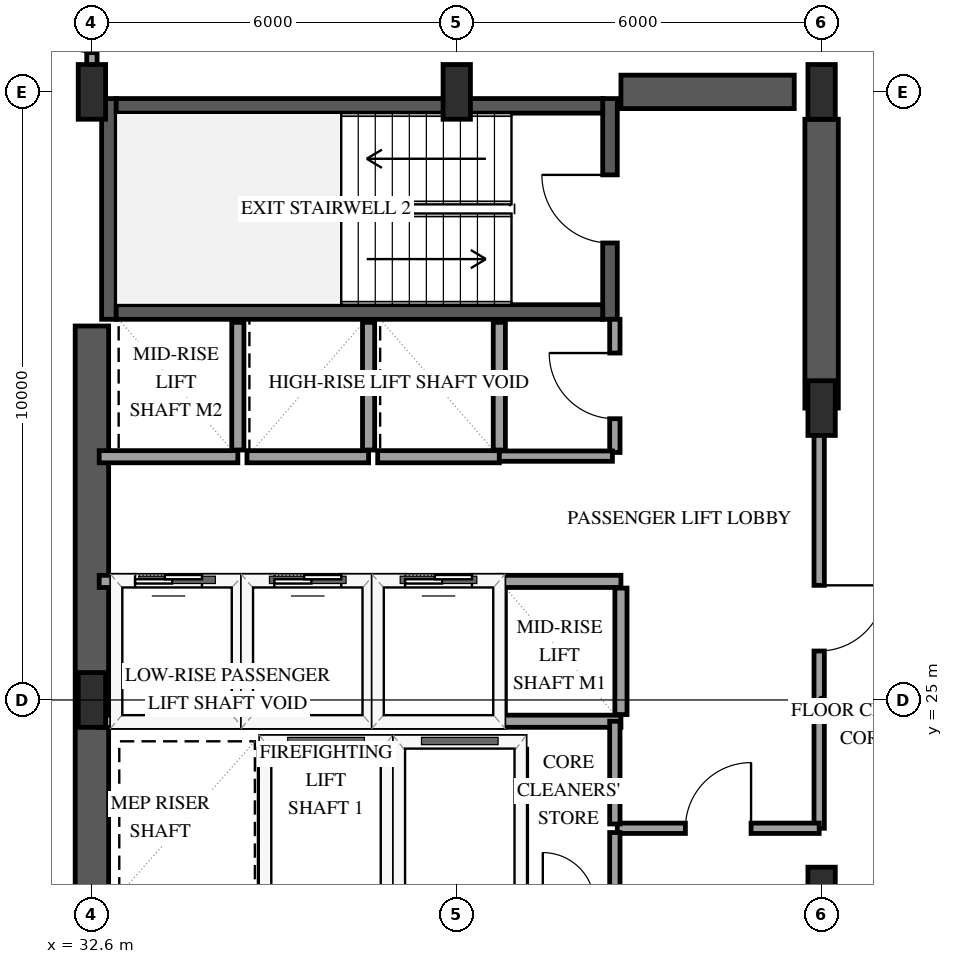
"""IFC4 building model, lengths in metres.
Left out: names, types, materials, properties, quantities, classifications, styles, units other than length and angle.
Written with IfcOpenShell. Run it as: python <this file> out.ifc"""

import sys

from ifc_helpers import new_model, si_unit, direction, frame, frame_2d, origin, origin_2d, place, context, subcontext, project, spatial, rectangle, extrude, element, fill, save


model = new_model("IFC4")
c1 = context("Model", 3, precision=1e-05, world=origin(), true_north=direction((0.0, 1.0)))
c2 = subcontext(c1, "Body", "Model", "MODEL_VIEW")
j1 = project(units=[si_unit("LENGTHUNIT", "METRE"), si_unit("PLANEANGLEUNIT", "RADIAN")], contexts=[c1])
p1 = place(None, origin())
s1 = spatial("IfcSite", under=j1, at=p1, CompositionType="ELEMENT")
p2 = place(p1, origin())
s2 = spatial("IfcBuilding", under=s1, at=p2, CompositionType="ELEMENT")
p3 = place(p2, frame((0.0, 0.0, 106.9)))
s3 = spatial("IfcBuildingStorey", under=s2, at=p3, CompositionType="ELEMENT", Elevation=106.9)
p4 = place(p3, frame((32.88, 31.26, 0.0), z_axis=(0.0, 0.0, 1.0), x_axis=(0.0, 1.0, 0.0)))
e1 = element("IfcWall", 1, at=p4, inside=s3, PredefinedType="SHEAR", context=c2, shape_type="SweptSolid", body=[
    extrude(rectangle(XDim=3.63, YDim=0.24, at=frame_2d((1.815, 0.0))), origin(), (0.0, 0.0, 1.0), 3.9),
])
p5 = place(p3, frame((41.12, 31.26, 0.0), z_axis=(0.0, 0.0, 1.0), x_axis=(0.0, 1.0, 0.0)))
e2 = element("IfcWall", 2, at=p5, inside=s3, PredefinedType="SHEAR", context=c2, shape_type="SweptSolid", body=[
    extrude(rectangle(XDim=3.63, YDim=0.24, at=frame_2d((1.815, 0.0))), origin(), (0.0, 0.0, 1.0), 3.9),
])
p6 = place(p5, frame((1.255, 0.0, 0.0)))
e3 = element("IfcOpeningElement", 3, at=p6, cuts=e2, PredefinedType="OPENING", context=c2, shape_type="SweptSolid", body=[
    extrude(rectangle(XDim=1.12, YDim=2.15, at=frame_2d((0.56, 1.075))), frame((0.0, 0.13, 0.0), z_axis=(0.0, -1.0, 0.0), x_axis=(1.0, 0.0, 0.0)), (0.0, 0.0, 1.0), 0.26),
])
for number, where, z_axis, x_axis in (
    (4, (33.0, 31.38, 0.0), (0.0, 0.0, 1.0), (1.0, 0.0, 0.0)),
    (5, (33.0, 34.77, 0.0), (0.0, 0.0, 1.0), (1.0, 0.0, 0.0)),
):
    element("IfcWall", number, at=place(p3, frame(where, z_axis=z_axis, x_axis=x_axis)), inside=s3, PredefinedType="SHEAR", context=c2, shape_type="SweptSolid", body=[
        extrude(rectangle(XDim=8.0, YDim=0.24, at=frame_2d((4.0, 0.0))), origin(), (0.0, 0.0, 1.0), 3.9),
    ])
p7 = place(p3, frame((32.6, 18.85, 0.0), z_axis=(0.0, 0.0, 1.0), x_axis=(0.0, 1.0, 0.0)))
e6 = element("IfcWall", 6, at=p7, inside=s3, PredefinedType="SHEAR", context=c2, shape_type="SweptSolid", body=[
    extrude(rectangle(XDim=12.3, YDim=0.55, at=frame_2d((6.15, 0.0))), origin(), (0.0, 0.0, 1.0), 3.9),
])
p8 = place(p3, frame((41.3, 35.0, 0.0), z_axis=(0.0, 0.0, 1.0), x_axis=(1.0, 0.0, 0.0)))
e7 = element("IfcWall", 7, at=p8, inside=s3, PredefinedType="SHEAR", context=c2, shape_type="SweptSolid", body=[
    extrude(rectangle(XDim=2.85, YDim=0.55, at=frame_2d((1.425, 0.0))), origin(), (0.0, 0.0, 1.0), 3.9),
])
p9 = place(p3, frame((44.6, 29.8, 0.0), z_axis=(0.0, 0.0, 1.0), x_axis=(0.0, 1.0, 0.0)))
e8 = element("IfcWall", 8, at=p9, inside=s3, PredefinedType="SHEAR", context=c2, shape_type="SweptSolid", body=[
    extrude(rectangle(XDim=4.75, YDim=0.55, at=frame_2d((2.375, 0.0))), origin(), (0.0, 0.0, 1.0), 3.9),
])
for number, where, z_axis, x_axis in (
    (9, (32.6, 25.0, 0.0), (0.0, 0.0, 1.0), (1.0, 0.0, 0.0)),
    (10, (32.6, 35.0, 0.0), (0.0, 0.0, 1.0), (1.0, 0.0, 0.0)),
    (11, (38.6, 35.0, 0.0), (0.0, 0.0, 1.0), (1.0, 0.0, 0.0)),
    (12, (44.6, 21.8, 0.0), (0.0, 0.0, 1.0), (1.0, 0.0, 0.0)),
    (13, (44.6, 29.8, 0.0), (0.0, 0.0, 1.0), (1.0, 0.0, 0.0)),
    (14, (44.6, 35.0, 0.0), (0.0, 0.0, 1.0), (1.0, 0.0, 0.0)),
):
    element("IfcColumn", number, at=place(p3, frame(where, z_axis=z_axis, x_axis=x_axis)), inside=s3, PredefinedType="PILASTER", context=c2, shape_type="SweptSolid", body=[
        extrude(rectangle(XDim=0.45, YDim=0.9, at=origin_2d()), origin(), (0.0, 0.0, 1.0), 3.9),
    ])
p10 = place(p3, frame((35.45, 24.3, 0.0), z_axis=(0.0, 0.0, 1.0), x_axis=(1.0, 0.0, 0.0)))
e15 = element("IfcWall", 15, at=p10, inside=s3, PredefinedType="SOLIDWALL", context=c2, shape_type="SweptSolid", body=[
    extrude(rectangle(XDim=2.0, YDim=0.2, at=frame_2d((1.0, 0.0))), origin(), (0.0, 0.0, 1.0), 3.6),
])
for number, where, z_axis, x_axis in (
    (16, (35.45, 21.81, 0.0), (0.0, 0.0, 1.0), (0.0, 1.0, 0.0)),
    (17, (37.45, 21.81, 0.0), (0.0, 0.0, 1.0), (0.0, 1.0, 0.0)),
):
    element("IfcWall", number, at=place(p3, frame(where, z_axis=z_axis, x_axis=x_axis)), inside=s3, PredefinedType="SOLIDWALL", context=c2, shape_type="SweptSolid", body=[
        extrude(rectangle(XDim=2.38, YDim=0.2, at=frame_2d((1.19, 0.0))), origin(), (0.0, 0.0, 1.0), 3.6),
    ])
p11 = place(p3, frame((37.65, 24.3, 0.0), z_axis=(0.0, 0.0, 1.0), x_axis=(1.0, 0.0, 0.0)))
e18 = element("IfcWall", 18, at=p11, inside=s3, PredefinedType="SOLIDWALL", context=c2, shape_type="SweptSolid", body=[
    extrude(rectangle(XDim=2.0, YDim=0.2, at=frame_2d((1.0, 0.0))), origin(), (0.0, 0.0, 1.0), 3.6),
])
p12 = place(p3, frame((39.65, 21.81, 0.0), z_axis=(0.0, 0.0, 1.0), x_axis=(0.0, 1.0, 0.0)))
e19 = element("IfcWall", 19, at=p12, inside=s3, PredefinedType="SOLIDWALL", context=c2, shape_type="SweptSolid", body=[
    extrude(rectangle(XDim=2.38, YDim=0.2, at=frame_2d((1.19, 0.0))), origin(), (0.0, 0.0, 1.0), 3.6),
])
p13 = place(p3, frame((32.72, 24.65, 0.0), z_axis=(0.0, 0.0, 1.0), x_axis=(1.0, 0.0, 0.0)))
e20 = element("IfcWall", 20, at=p13, inside=s3, PredefinedType="SOLIDWALL", context=c2, shape_type="SweptSolid", body=[
    extrude(rectangle(XDim=2.28, YDim=0.2, at=frame_2d((1.14, 0.0))), origin(), (0.0, 0.0, 1.0), 3.6),
])
p14 = place(p3, frame((32.72, 26.95, 0.0), z_axis=(0.0, 0.0, 1.0), x_axis=(1.0, 0.0, 0.0)))
e21 = element("IfcWall", 21, at=p14, inside=s3, PredefinedType="SOLIDWALL", context=c2, shape_type="SweptSolid", body=[
    extrude(rectangle(XDim=2.28, YDim=0.2, at=frame_2d((1.14, 0.0))), origin(), (0.0, 0.0, 1.0), 3.6),
])
p15 = place(p14, frame((0.59, 0.0, 0.0)))
e22 = element("IfcOpeningElement", 22, at=p15, cuts=e21, PredefinedType="OPENING", context=c2, shape_type="SweptSolid", body=[
    extrude(rectangle(XDim=1.1, YDim=2.15, at=frame_2d((0.55, 1.075))), frame((0.0, 0.11, 0.0), z_axis=(0.0, -1.0, 0.0), x_axis=(1.0, 0.0, 0.0)), (0.0, 0.0, 1.0), 0.22),
])
p16 = place(p3, frame((35.0, 24.76, 0.0), z_axis=(0.0, 0.0, 1.0), x_axis=(0.0, 1.0, 0.0)))
e23 = element("IfcWall", 23, at=p16, inside=s3, PredefinedType="SOLIDWALL", context=c2, shape_type="SweptSolid", body=[
    extrude(rectangle(XDim=2.08, YDim=0.2, at=frame_2d((1.04, 0.0))), origin(), (0.0, 0.0, 1.0), 3.6),
])
p17 = place(p3, frame((35.15, 24.65, 0.0), z_axis=(0.0, 0.0, 1.0), x_axis=(1.0, 0.0, 0.0)))
e24 = element("IfcWall", 24, at=p17, inside=s3, PredefinedType="SOLIDWALL", context=c2, shape_type="SweptSolid", body=[
    extrude(rectangle(XDim=2.0, YDim=0.2, at=frame_2d((1.0, 0.0))), origin(), (0.0, 0.0, 1.0), 3.6),
])
p18 = place(p3, frame((35.15, 26.95, 0.0), z_axis=(0.0, 0.0, 1.0), x_axis=(1.0, 0.0, 0.0)))
e25 = element("IfcWall", 25, at=p18, inside=s3, PredefinedType="SOLIDWALL", context=c2, shape_type="SweptSolid", body=[
    extrude(rectangle(XDim=2.0, YDim=0.2, at=frame_2d((1.0, 0.0))), origin(), (0.0, 0.0, 1.0), 3.6),
])
p19 = place(p18, frame((0.45, 0.0, 0.0)))
e26 = element("IfcOpeningElement", 26, at=p19, cuts=e25, PredefinedType="OPENING", context=c2, shape_type="SweptSolid", body=[
    extrude(rectangle(XDim=1.1, YDim=2.15, at=frame_2d((0.55, 1.075))), frame((0.0, 0.11, 0.0), z_axis=(0.0, -1.0, 0.0), x_axis=(1.0, 0.0, 0.0)), (0.0, 0.0, 1.0), 0.22),
])
p20 = place(p3, frame((37.15, 24.76, 0.0), z_axis=(0.0, 0.0, 1.0), x_axis=(0.0, 1.0, 0.0)))
e27 = element("IfcWall", 27, at=p20, inside=s3, PredefinedType="SOLIDWALL", context=c2, shape_type="SweptSolid", body=[
    extrude(rectangle(XDim=2.08, YDim=0.2, at=frame_2d((1.04, 0.0))), origin(), (0.0, 0.0, 1.0), 3.6),
])
p21 = place(p3, frame((37.3, 24.65, 0.0), z_axis=(0.0, 0.0, 1.0), x_axis=(1.0, 0.0, 0.0)))
e28 = element("IfcWall", 28, at=p21, inside=s3, PredefinedType="SOLIDWALL", context=c2, shape_type="SweptSolid", body=[
    extrude(rectangle(XDim=2.0, YDim=0.2, at=frame_2d((1.0, 0.0))), origin(), (0.0, 0.0, 1.0), 3.6),
])
p22 = place(p3, frame((37.3, 26.95, 0.0), z_axis=(0.0, 0.0, 1.0), x_axis=(1.0, 0.0, 0.0)))
e29 = element("IfcWall", 29, at=p22, inside=s3, PredefinedType="SOLIDWALL", context=c2, shape_type="SweptSolid", body=[
    extrude(rectangle(XDim=2.0, YDim=0.2, at=frame_2d((1.0, 0.0))), origin(), (0.0, 0.0, 1.0), 3.6),
])
p23 = place(p22, frame((0.45, 0.0, 0.0)))
e30 = element("IfcOpeningElement", 30, at=p23, cuts=e29, PredefinedType="OPENING", context=c2, shape_type="SweptSolid", body=[
    extrude(rectangle(XDim=1.1, YDim=2.15, at=frame_2d((0.55, 1.075))), frame((0.0, 0.11, 0.0), z_axis=(0.0, -1.0, 0.0), x_axis=(1.0, 0.0, 0.0)), (0.0, 0.0, 1.0), 0.22),
])
p24 = place(p3, frame((39.3, 24.76, 0.0), z_axis=(0.0, 0.0, 1.0), x_axis=(0.0, 1.0, 0.0)))
e31 = element("IfcWall", 31, at=p24, inside=s3, PredefinedType="SOLIDWALL", context=c2, shape_type="SweptSolid", body=[
    extrude(rectangle(XDim=2.08, YDim=0.2, at=frame_2d((1.04, 0.0))), origin(), (0.0, 0.0, 1.0), 3.6),
])
for number, where, z_axis, x_axis in (
    (32, (39.3, 24.65, 0.0), (0.0, 0.0, 1.0), (1.0, 0.0, 0.0)),
    (33, (39.3, 26.95, 0.0), (0.0, 0.0, 1.0), (1.0, 0.0, 0.0)),
):
    element("IfcWall", number, at=place(p3, frame(where, z_axis=z_axis, x_axis=x_axis)), inside=s3, PredefinedType="SOLIDWALL", context=c2, shape_type="SweptSolid", body=[
        extrude(rectangle(XDim=2.0, YDim=0.2, at=frame_2d((1.0, 0.0))), origin(), (0.0, 0.0, 1.0), 3.6),
    ])
p25 = place(p3, frame((41.3, 24.76, 0.0), z_axis=(0.0, 0.0, 1.0), x_axis=(0.0, 1.0, 0.0)))
e34 = element("IfcWall", 34, at=p25, inside=s3, PredefinedType="SOLIDWALL", context=c2, shape_type="SweptSolid", body=[
    extrude(rectangle(XDim=2.08, YDim=0.2, at=frame_2d((1.04, 0.0))), origin(), (0.0, 0.0, 1.0), 3.6),
])
p26 = place(p3, frame((32.72, 29.0, 0.0), z_axis=(0.0, 0.0, 1.0), x_axis=(1.0, 0.0, 0.0)))
e35 = element("IfcWall", 35, at=p26, inside=s3, PredefinedType="SOLIDWALL", context=c2, shape_type="SweptSolid", body=[
    extrude(rectangle(XDim=2.28, YDim=0.2, at=frame_2d((1.14, 0.0))), origin(), (0.0, 0.0, 1.0), 3.6),
])
p27 = place(p3, frame((35.0, 29.11, 0.0), z_axis=(0.0, 0.0, 1.0), x_axis=(0.0, 1.0, 0.0)))
e36 = element("IfcWall", 36, at=p27, inside=s3, PredefinedType="SOLIDWALL", context=c2, shape_type="SweptSolid", body=[
    extrude(rectangle(XDim=2.1, YDim=0.2, at=frame_2d((1.05, 0.0))), origin(), (0.0, 0.0, 1.0), 3.6),
])
p28 = place(p3, frame((35.15, 29.0, 0.0), z_axis=(0.0, 0.0, 1.0), x_axis=(1.0, 0.0, 0.0)))
e37 = element("IfcWall", 37, at=p28, inside=s3, PredefinedType="SOLIDWALL", context=c2, shape_type="SweptSolid", body=[
    extrude(rectangle(XDim=2.0, YDim=0.2, at=frame_2d((1.0, 0.0))), origin(), (0.0, 0.0, 1.0), 3.6),
])
p29 = place(p3, frame((37.15, 29.11, 0.0), z_axis=(0.0, 0.0, 1.0), x_axis=(0.0, 1.0, 0.0)))
e38 = element("IfcWall", 38, at=p29, inside=s3, PredefinedType="SOLIDWALL", context=c2, shape_type="SweptSolid", body=[
    extrude(rectangle(XDim=2.1, YDim=0.2, at=frame_2d((1.05, 0.0))), origin(), (0.0, 0.0, 1.0), 3.6),
])
p30 = place(p3, frame((37.3, 29.0, 0.0), z_axis=(0.0, 0.0, 1.0), x_axis=(1.0, 0.0, 0.0)))
e39 = element("IfcWall", 39, at=p30, inside=s3, PredefinedType="SOLIDWALL", context=c2, shape_type="SweptSolid", body=[
    extrude(rectangle(XDim=2.0, YDim=0.2, at=frame_2d((1.0, 0.0))), origin(), (0.0, 0.0, 1.0), 3.6),
])
p31 = place(p3, frame((39.3, 29.11, 0.0), z_axis=(0.0, 0.0, 1.0), x_axis=(0.0, 1.0, 0.0)))
e40 = element("IfcWall", 40, at=p31, inside=s3, PredefinedType="SOLIDWALL", context=c2, shape_type="SweptSolid", body=[
    extrude(rectangle(XDim=2.1, YDim=0.2, at=frame_2d((1.05, 0.0))), origin(), (0.0, 0.0, 1.0), 3.6),
])
p32 = place(p3, frame((44.56, 29.8, 0.0), z_axis=(0.0, 0.0, 1.0), x_axis=(0.0, -1.0, 0.0)))
e41 = element("IfcWall", 41, at=p32, inside=s3, PredefinedType="PARTITIONING", context=c2, shape_type="SweptSolid", body=[
    extrude(rectangle(XDim=6.91, YDim=0.17, at=frame_2d((3.455, 0.0))), origin(), (0.0, 0.0, 1.0), 2.64),
])
p33 = place(p32, frame((2.915, 0.0, 0.0)))
e42 = element("IfcOpeningElement", 42, at=p33, cuts=e41, PredefinedType="OPENING", context=c2, shape_type="SweptSolid", body=[
    extrude(rectangle(XDim=1.08, YDim=2.15, at=frame_2d((0.54, 1.075))), frame((0.0, 0.095, 0.0), z_axis=(0.0, -1.0, 0.0), x_axis=(1.0, 0.0, 0.0)), (0.0, 0.0, 1.0), 0.19),
])
p34 = place(p3, frame((41.24, 22.89, 0.0), z_axis=(0.0, 0.0, 1.0), x_axis=(1.0, 0.0, 0.0)))
e43 = element("IfcWall", 43, at=p34, inside=s3, PredefinedType="PARTITIONING", context=c2, shape_type="SweptSolid", body=[
    extrude(rectangle(XDim=3.32, YDim=0.17, at=frame_2d((1.66, 0.0))), origin(), (0.0, 0.0, 1.0), 3.6),
])
p35 = place(p34, frame((1.12, 0.0, 0.0)))
e44 = element("IfcOpeningElement", 44, at=p35, cuts=e43, PredefinedType="OPENING", context=c2, shape_type="SweptSolid", body=[
    extrude(rectangle(XDim=1.08, YDim=2.15, at=frame_2d((0.54, 1.075))), frame((0.0, 0.095, 0.0), z_axis=(0.0, -1.0, 0.0), x_axis=(1.0, 0.0, 0.0)), (0.0, 0.0, 1.0), 0.19),
])
p36 = place(p3, frame((41.2, 29.07, 0.0), z_axis=(0.0, 0.0, 1.0), x_axis=(0.0, 1.0, 0.0)))
e45 = element("IfcWall", 45, at=p36, inside=s3, PredefinedType="PARTITIONING", context=c2, shape_type="SweptSolid", body=[
    extrude(rectangle(XDim=2.19, YDim=0.17, at=frame_2d((1.095, 0.0))), origin(), (0.0, 0.0, 1.0), 3.6),
])
p37 = place(p36, frame((0.555, 0.0, 0.0)))
e46 = element("IfcOpeningElement", 46, at=p37, cuts=e45, PredefinedType="OPENING", context=c2, shape_type="SweptSolid", body=[
    extrude(rectangle(XDim=1.08, YDim=2.15, at=frame_2d((0.54, 1.075))), frame((0.0, 0.095, 0.0), z_axis=(0.0, -1.0, 0.0), x_axis=(1.0, 0.0, 0.0)), (0.0, 0.0, 1.0), 0.19),
])
p38 = place(p3, frame((32.6, 35.07, 0.0), z_axis=(0.0, 0.0, 1.0), x_axis=(0.0, 1.0, 0.0)))
e47 = element("IfcWall", 47, at=p38, inside=s3, PredefinedType="PARTITIONING", context=c2, shape_type="SweptSolid", body=[
    extrude(rectangle(XDim=1.91, YDim=0.17, at=frame_2d((0.955, 0.0))), origin(), (0.0, 0.0, 1.0), 3.6),
])
p39 = place(p38, frame((0.575, 0.0, 0.0)))
e48 = element("IfcOpeningElement", 48, at=p39, cuts=e47, PredefinedType="OPENING", context=c2, shape_type="SweptSolid", body=[
    extrude(rectangle(XDim=0.98, YDim=2.15, at=frame_2d((0.49, 1.075))), frame((0.0, 0.095, 0.0), z_axis=(0.0, -1.0, 0.0), x_axis=(1.0, 0.0, 0.0)), (0.0, 0.0, 1.0), 0.19),
])
p40 = place(p3, frame((39.3, 29.01, 0.0), z_axis=(0.0, 0.0, 1.0), x_axis=(1.0, 0.0, 0.0)))
e49 = element("IfcWall", 49, at=p40, inside=s3, PredefinedType="PARTITIONING", context=c2, shape_type="SweptSolid", body=[
    extrude(rectangle(XDim=1.86, YDim=0.17, at=frame_2d((0.93, 0.0))), origin(), (0.0, 0.0, 1.0), 3.6),
])
p41 = place(p3, frame((41.2, 22.96, 0.0), z_axis=(0.0, 0.0, 1.0), x_axis=(0.0, 1.0, 0.0)))
e50 = element("IfcWall", 50, at=p41, inside=s3, PredefinedType="PARTITIONING", context=c2, shape_type="SweptSolid", body=[
    extrude(rectangle(XDim=1.69, YDim=0.17, at=frame_2d((0.845, 0.0))), origin(), (0.0, 0.0, 1.0), 3.6),
])
p42 = place(p3, frame((41.2, 21.7, 0.0), z_axis=(0.0, 0.0, 1.0), x_axis=(0.0, 1.0, 0.0)))
e51 = element("IfcWall", 51, at=p42, inside=s3, PredefinedType="PARTITIONING", context=c2, shape_type="SweptSolid", body=[
    extrude(rectangle(XDim=1.12, YDim=0.17, at=frame_2d((0.56, 0.0))), origin(), (0.0, 0.0, 1.0), 3.6),
])
p43 = place(p15, origin())
e52 = element("IfcDoor", 52, at=p43, inside=s3, OperationType="SLIDING_TO_LEFT", PredefinedType="DOOR", context=c2, shape_type="SweptSolid", body=[
    extrude(rectangle(XDim=1.1, YDim=2.15, at=frame_2d((0.55, 1.075))), frame((0.0, 0.025, 0.0), z_axis=(0.0, -1.0, 0.0), x_axis=(1.0, 0.0, 0.0)), (0.0, 0.0, 1.0), 0.05),
])
fill(e22, e52)
p44 = place(p19, origin())
e53 = element("IfcDoor", 53, at=p44, inside=s3, OperationType="SLIDING_TO_LEFT", PredefinedType="DOOR", context=c2, shape_type="SweptSolid", body=[
    extrude(rectangle(XDim=1.1, YDim=2.15, at=frame_2d((0.55, 1.075))), frame((0.0, 0.025, 0.0), z_axis=(0.0, -1.0, 0.0), x_axis=(1.0, 0.0, 0.0)), (0.0, 0.0, 1.0), 0.05),
])
fill(e26, e53)
p45 = place(p23, origin())
e54 = element("IfcDoor", 54, at=p45, inside=s3, OperationType="SLIDING_TO_LEFT", PredefinedType="DOOR", context=c2, shape_type="SweptSolid", body=[
    extrude(rectangle(XDim=1.1, YDim=2.15, at=frame_2d((0.55, 1.075))), frame((0.0, 0.025, 0.0), z_axis=(0.0, -1.0, 0.0), x_axis=(1.0, 0.0, 0.0)), (0.0, 0.0, 1.0), 0.05),
])
fill(e30, e54)
p46 = place(p6, origin())
e55 = element("IfcDoor", 55, at=p46, inside=s3, OperationType="SINGLE_SWING_RIGHT", PredefinedType="DOOR", context=c2, shape_type="SweptSolid", body=[
    extrude(rectangle(XDim=1.12, YDim=2.15, at=frame_2d((0.56, 1.075))), frame((0.0, 0.025, 0.0), z_axis=(0.0, -1.0, 0.0), x_axis=(1.0, 0.0, 0.0)), (0.0, 0.0, 1.0), 0.05),
])
fill(e3, e55)
p47 = place(p33, origin())
e56 = element("IfcDoor", 56, at=p47, inside=s3, OperationType="SINGLE_SWING_LEFT", PredefinedType="DOOR", context=c2, shape_type="SweptSolid", body=[
    extrude(rectangle(XDim=1.08, YDim=2.15, at=frame_2d((0.54, 1.075))), frame((0.0, 0.025, 0.0), z_axis=(0.0, -1.0, 0.0), x_axis=(1.0, 0.0, 0.0)), (0.0, 0.0, 1.0), 0.05),
])
fill(e42, e56)
p48 = place(p35, origin())
e57 = element("IfcDoor", 57, at=p48, inside=s3, OperationType="SINGLE_SWING_RIGHT", PredefinedType="DOOR", context=c2, shape_type="SweptSolid", body=[
    extrude(rectangle(XDim=1.08, YDim=2.15, at=frame_2d((0.54, 1.075))), frame((0.0, 0.025, 0.0), z_axis=(0.0, -1.0, 0.0), x_axis=(1.0, 0.0, 0.0)), (0.0, 0.0, 1.0), 0.05),
])
fill(e44, e57)
p49 = place(p37, origin())
e58 = element("IfcDoor", 58, at=p49, inside=s3, OperationType="SINGLE_SWING_RIGHT", PredefinedType="DOOR", context=c2, shape_type="SweptSolid", body=[
    extrude(rectangle(XDim=1.08, YDim=2.15, at=frame_2d((0.54, 1.075))), frame((0.0, 0.025, 0.0), z_axis=(0.0, -1.0, 0.0), x_axis=(1.0, 0.0, 0.0)), (0.0, 0.0, 1.0), 0.05),
])
fill(e46, e58)
p50 = place(p39, origin())
e59 = element("IfcDoor", 59, at=p50, inside=s3, OperationType="SINGLE_SWING_RIGHT", PredefinedType="DOOR", context=c2, shape_type="SweptSolid", body=[
    extrude(rectangle(XDim=0.98, YDim=2.15, at=frame_2d((0.49, 1.075))), frame((0.0, 0.025, 0.0), z_axis=(0.0, -1.0, 0.0), x_axis=(1.0, 0.0, 0.0)), (0.0, 0.0, 1.0), 0.05),
])
fill(e48, e59)
save(model, sys.argv[1])
